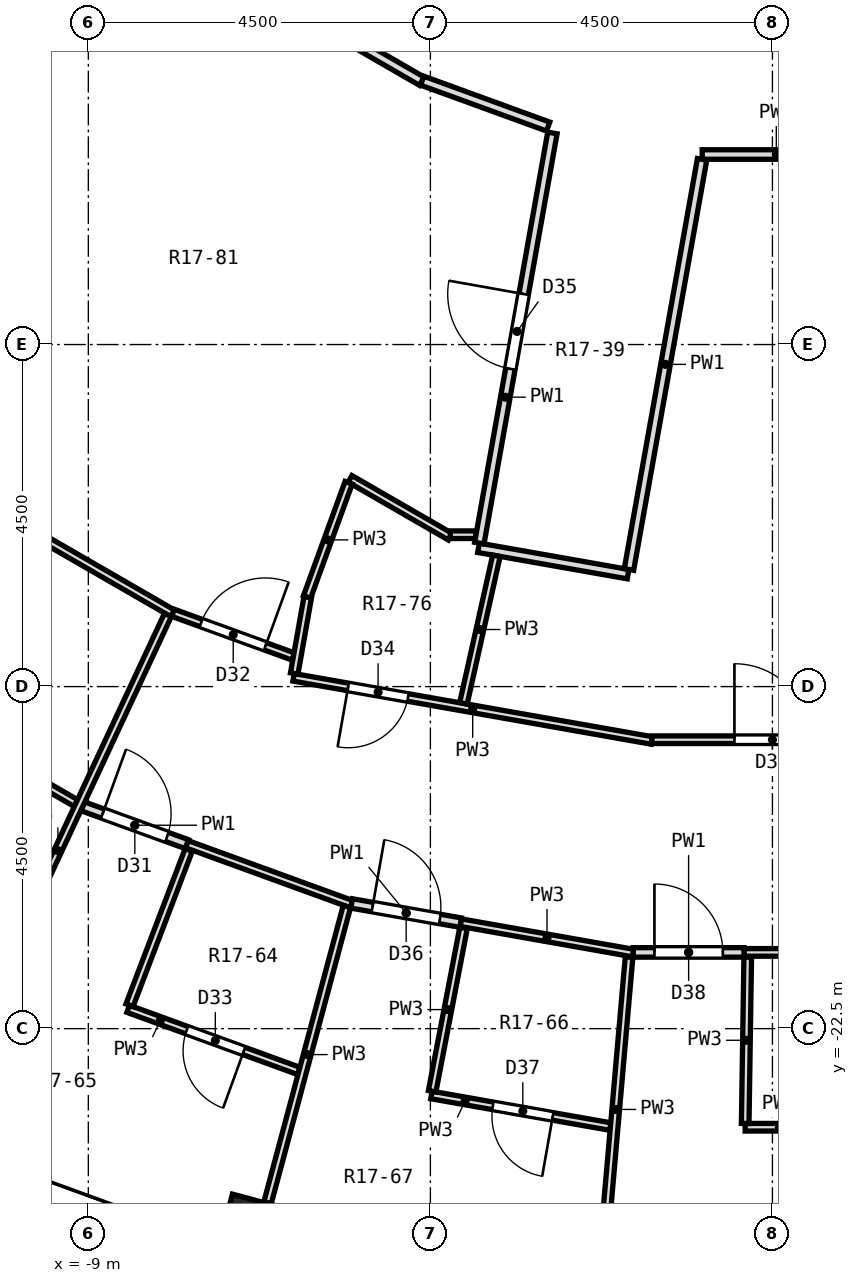
"""IFC4 building model, lengths in metres.
Left out: names, types, materials, properties, quantities, classifications, styles, units other than length and angle.
Written with IfcOpenShell. Run it as: python <this file> out.ifc"""

import sys

from ifc_helpers import new_model, si_unit, direction, frame, frame_2d, origin, origin_2d, place, context, subcontext, project, spatial, rectangle, extrude, element, fill, save


model = new_model("IFC4")
c1 = context("Model", 3, precision=1e-05, world=origin(), true_north=direction((0.0, 1.0)))
c2 = subcontext(c1, "Body", "Model", "MODEL_VIEW")
j1 = project(units=[si_unit("LENGTHUNIT", "METRE"), si_unit("PLANEANGLEUNIT", "RADIAN")], contexts=[c1])
p1 = place(None, origin())
s1 = spatial("IfcSite", under=j1, at=p1, CompositionType="ELEMENT")
p2 = place(p1, origin())
s2 = spatial("IfcBuilding", under=s1, at=p2, CompositionType="ELEMENT")
p3 = place(p2, frame((0.0, 0.0, 91.9)))
s3 = spatial("IfcBuildingStorey", under=s2, at=p3, CompositionType="ELEMENT", Elevation=91.9)
p4 = place(p3, frame((-6.768, -25.259, 0.0), z_axis=(0.0, 0.0, 1.0), x_axis=(-0.258819045103, -0.965925826289, 0.0)))
e1 = element("IfcColumn", 1, at=p4, inside=s3, PredefinedType="COLUMN", context=c2, shape_type="SweptSolid", body=[
    extrude(rectangle(XDim=0.95, YDim=0.95, at=origin_2d()), origin(), (0.0, 0.0, 1.0), 3.3),
])
p5 = place(p3, frame((-10.811, -24.369, 0.0), z_axis=(0.0, 0.0, 1.0), x_axis=(0.939703505393, -0.341990236633, 0.0)))
e2 = element("IfcWall", 2, at=p5, inside=s3, PredefinedType="SOLIDWALL", context=c2, shape_type="SweptSolid", body=[
    extrude(rectangle(XDim=3.648, YDim=0.6, at=frame_2d((1.824, 0.0))), origin(), (0.0, 0.0, 1.0), 2.8),
])
p6 = place(p5, frame((0.674, 0.0, 0.9)))
e3 = element("IfcOpeningElement", 3, at=p6, cuts=e2, PredefinedType="OPENING", context=c2, shape_type="SweptSolid", body=[
    extrude(rectangle(XDim=2.3, YDim=1.8, at=frame_2d((1.15, 0.9))), frame((0.0, 0.312, 0.0), z_axis=(0.0, -1.0, 0.0), x_axis=(1.0, 0.0, 0.0)), (0.0, 0.0, 1.0), 0.624),
])
p7 = place(p3, frame((-11.072, -18.43, 0.0), z_axis=(0.0, 0.0, 1.0), x_axis=(0.865848017448, -0.500307116361, 0.0)))
e4 = element("IfcWall", 4, at=p7, inside=s3, PredefinedType="PARTITIONING", context=c2, shape_type="SweptSolid", body=[
    extrude(rectangle(XDim=2.205, YDim=0.1, at=frame_2d((1.102, 0.0))), origin(), (0.0, 0.0, 1.0), 2.8),
])
p8 = place(p3, frame((-10.723, -15.401, 0.0), z_axis=(0.0, 0.0, 1.0), x_axis=(0.866002935623, -0.500038913978, 0.0)))
e5 = element("IfcWall", 5, at=p8, inside=s3, PredefinedType="PARTITIONING", context=c2, shape_type="SweptSolid", body=[
    extrude(rectangle(XDim=3.272, YDim=0.1, at=frame_2d((1.636, 0.0))), origin(), (0.0, 0.0, 1.0), 2.8),
])
p9 = place(p3, frame((-5.557, -15.267, 0.0), z_axis=(0.0, 0.0, 1.0), x_axis=(0.866084140742, -0.499898250802, 0.0)))
e6 = element("IfcWall", 6, at=p9, inside=s3, PredefinedType="PARTITIONING", context=c2, shape_type="SweptSolid", body=[
    extrude(rectangle(XDim=1.523, YDim=0.1, at=frame_2d((0.761, 0.0))), origin(), (0.0, 0.0, 1.0), 2.8),
])
p10 = place(p3, frame((-6.278, -9.074, 0.0), z_axis=(0.0, 0.0, 1.0), x_axis=(0.865970077019, -0.500095816526, 0.0)))
e7 = element("IfcWall", 7, at=p10, inside=s3, PredefinedType="PARTITIONING", context=c2, shape_type="SweptSolid", body=[
    extrude(rectangle(XDim=1.924, YDim=0.125, at=frame_2d((0.962, 0.0))), origin(), (0.0, 0.0, 1.0), 2.8),
])
p11 = place(p3, frame((-8.476, -22.239, 0.0), z_axis=(0.0, 0.0, 1.0), x_axis=(0.939644231496, -0.342153062556, 0.0)))
e8 = element("IfcWall", 8, at=p11, inside=s3, PredefinedType="PARTITIONING", context=c2, shape_type="SweptSolid", body=[
    extrude(rectangle(XDim=2.39, YDim=0.1, at=frame_2d((1.195, 0.0))), origin(), (0.0, 0.0, 1.0), 2.8),
])
p12 = place(p11, frame((0.82, 0.0, 0.0)))
e9 = element("IfcOpeningElement", 9, at=p12, cuts=e8, PredefinedType="OPENING", context=c2, shape_type="SweptSolid", body=[
    extrude(rectangle(XDim=0.8, YDim=2.1, at=frame_2d((0.4, 1.05))), frame((0.0, 0.062, 0.0), z_axis=(0.0, -1.0, 0.0), x_axis=(1.0, 0.0, 0.0)), (0.0, 0.0, 1.0), 0.124),
])
p13 = place(p3, frame((-7.704, -20.073, 0.0), z_axis=(0.0, 0.0, 1.0), x_axis=(0.939734670151, -0.34190459154, 0.0)))
e10 = element("IfcWall", 10, at=p13, inside=s3, PredefinedType="PARTITIONING", context=c2, shape_type="SweptSolid", body=[
    extrude(rectangle(XDim=2.306, YDim=0.1, at=frame_2d((1.153, 0.0))), origin(), (0.0, 0.0, 1.0), 2.8),
])
p14 = place(p3, frame((-9.073, -19.575, 0.0), z_axis=(0.0, 0.0, 1.0), x_axis=(0.939788529673, -0.341756520778, 0.0)))
e11 = element("IfcWall", 11, at=p14, inside=s3, PredefinedType="PARTITIONING", context=c2, shape_type="SweptSolid", body=[
    extrude(rectangle(XDim=1.457, YDim=0.125, at=frame_2d((0.728, 0.0))), origin(), (0.0, 0.0, 1.0), 2.8),
])
p15 = place(p14, frame((0.278, 0.0, 0.0)))
e12 = element("IfcOpeningElement", 12, at=p15, cuts=e11, PredefinedType="OPENING", context=c2, shape_type="SweptSolid", body=[
    extrude(rectangle(XDim=0.9, YDim=2.1, at=frame_2d((0.45, 1.05))), frame((0.0, 0.074, 0.0), z_axis=(0.0, -1.0, 0.0), x_axis=(1.0, 0.0, 0.0)), (0.0, 0.0, 1.0), 0.149),
])
p16 = place(p3, frame((-7.886, -17.029, 0.0), z_axis=(0.0, 0.0, 1.0), x_axis=(0.939806110693, -0.341708171258, 0.0)))
e13 = element("IfcWall", 13, at=p16, inside=s3, PredefinedType="PARTITIONING", context=c2, shape_type="SweptSolid", body=[
    extrude(rectangle(XDim=1.686, YDim=0.1, at=frame_2d((0.843, 0.0))), origin(), (0.0, 0.0, 1.0), 2.8),
])
p17 = place(p16, frame((0.393, 0.0, 0.0)))
e14 = element("IfcOpeningElement", 14, at=p17, cuts=e13, PredefinedType="OPENING", context=c2, shape_type="SweptSolid", body=[
    extrude(rectangle(XDim=0.9, YDim=2.1, at=frame_2d((0.45, 1.05))), frame((0.0, 0.062, 0.0), z_axis=(0.0, -1.0, 0.0), x_axis=(1.0, 0.0, 0.0)), (0.0, 0.0, 1.0), 0.124),
])
p18 = place(p3, frame((-4.608, -10.028, 0.0), z_axis=(0.0, 0.0, 1.0), x_axis=(0.939587139824, -0.342309810958, 0.0)))
e15 = element("IfcWall", 15, at=p18, inside=s3, PredefinedType="PARTITIONING", context=c2, shape_type="SweptSolid", body=[
    extrude(rectangle(XDim=1.764, YDim=0.125, at=frame_2d((0.882, 0.0))), origin(), (0.0, 0.0, 1.0), 2.8),
])
p19 = place(p3, frame((-4.486, -23.373, 0.0), z_axis=(0.0, 0.0, 1.0), x_axis=(0.984798975022, -0.17369795277, 0.0)))
e16 = element("IfcWall", 16, at=p19, inside=s3, PredefinedType="PARTITIONING", context=c2, shape_type="SweptSolid", body=[
    extrude(rectangle(XDim=2.391, YDim=0.1, at=frame_2d((1.195, 0.0))), origin(), (0.0, 0.0, 1.0), 2.8),
])
p20 = place(p19, frame((0.821, 0.0, 0.0)))
e17 = element("IfcOpeningElement", 17, at=p20, cuts=e16, PredefinedType="OPENING", context=c2, shape_type="SweptSolid", body=[
    extrude(rectangle(XDim=0.8, YDim=2.1, at=frame_2d((0.4, 1.05))), frame((0.0, 0.062, 0.0), z_axis=(0.0, -1.0, 0.0), x_axis=(1.0, 0.0, 0.0)), (0.0, 0.0, 1.0), 0.124),
])
p21 = place(p3, frame((-4.101, -21.105, 0.0), z_axis=(0.0, 0.0, 1.0), x_axis=(0.984783558818, -0.173785333909, 0.0)))
e18 = element("IfcWall", 18, at=p21, inside=s3, PredefinedType="PARTITIONING", context=c2, shape_type="SweptSolid", body=[
    extrude(rectangle(XDim=2.305, YDim=0.1, at=frame_2d((1.153, 0.0))), origin(), (0.0, 0.0, 1.0), 2.8),
])
p22 = place(p3, frame((-5.536, -20.853, 0.0), z_axis=(0.0, 0.0, 1.0), x_axis=(0.984862774054, -0.173335848233, 0.0)))
e19 = element("IfcWall", 19, at=p22, inside=s3, PredefinedType="PARTITIONING", context=c2, shape_type="SweptSolid", body=[
    extrude(rectangle(XDim=1.456, YDim=0.125, at=frame_2d((0.728, 0.0))), origin(), (0.0, 0.0, 1.0), 2.8),
])
p23 = place(p22, frame((0.278, 0.0, 0.0)))
e20 = element("IfcOpeningElement", 20, at=p23, cuts=e19, PredefinedType="OPENING", context=c2, shape_type="SweptSolid", body=[
    extrude(rectangle(XDim=0.9, YDim=2.1, at=frame_2d((0.45, 1.05))), frame((0.0, 0.074, 0.0), z_axis=(0.0, -1.0, 0.0), x_axis=(1.0, 0.0, 0.0)), (0.0, 0.0, 1.0), 0.149),
])
p24 = place(p3, frame((-6.3, -17.878, 0.0), z_axis=(0.0, 0.0, 1.0), x_axis=(0.984813837489, -0.173613667348, 0.0)))
e21 = element("IfcWall", 21, at=p24, inside=s3, PredefinedType="PARTITIONING", context=c2, shape_type="SweptSolid", body=[
    extrude(rectangle(XDim=4.787, YDim=0.1, at=frame_2d((2.394, 0.0))), origin(), (0.0, 0.0, 1.0), 2.8),
])
p25 = place(p24, frame((0.729, 0.0, 0.0)))
e22 = element("IfcOpeningElement", 22, at=p25, cuts=e21, PredefinedType="OPENING", context=c2, shape_type="SweptSolid", body=[
    extrude(rectangle(XDim=0.8, YDim=2.1, at=frame_2d((0.4, 1.05))), frame((0.0, 0.062, 0.0), z_axis=(0.0, -1.0, 0.0), x_axis=(1.0, 0.0, 0.0)), (0.0, 0.0, 1.0), 0.124),
])
p26 = place(p3, frame((-3.867, -16.174, 0.0), z_axis=(0.0, 0.0, 1.0), x_axis=(0.984836400178, -0.173485633079, 0.0)))
e23 = element("IfcWall", 23, at=p26, inside=s3, PredefinedType="PARTITIONING", context=c2, shape_type="SweptSolid", body=[
    extrude(rectangle(XDim=1.998, YDim=0.125, at=frame_2d((0.999, 0.0))), origin(), (0.0, 0.0, 1.0), 2.8),
])
p27 = place(p3, frame((-0.359, -23.797, 0.0), z_axis=(0.0, 0.0, 1.0), x_axis=(1.0, 0.0, 0.0)))
e24 = element("IfcWall", 24, at=p27, inside=s3, PredefinedType="PARTITIONING", context=c2, shape_type="SweptSolid", body=[
    extrude(rectangle(XDim=2.391, YDim=0.1, at=frame_2d((1.195, 0.0))), origin(), (0.0, 0.0, 1.0), 2.8),
])
p28 = place(p27, frame((0.821, 0.0, 0.0)))
e25 = element("IfcOpeningElement", 25, at=p28, cuts=e24, PredefinedType="OPENING", context=c2, shape_type="SweptSolid", body=[
    extrude(rectangle(XDim=0.8, YDim=2.1, at=frame_2d((0.4, 1.05))), frame((0.0, 0.062, 0.0), z_axis=(0.0, -1.0, 0.0), x_axis=(1.0, 0.0, 0.0)), (0.0, 0.0, 1.0), 0.124),
])
p29 = place(p3, frame((-0.374, -21.497, 0.0), z_axis=(0.0, 0.0, 1.0), x_axis=(1.0, 0.0, 0.0)))
e26 = element("IfcWall", 26, at=p29, inside=s3, PredefinedType="PARTITIONING", context=c2, shape_type="SweptSolid", body=[
    extrude(rectangle(XDim=2.205, YDim=0.1, at=frame_2d((1.103, 0.0))), origin(), (0.0, 0.0, 1.0), 2.8),
])
p30 = place(p3, frame((-1.831, -21.497, 0.0), z_axis=(0.0, 0.0, 1.0), x_axis=(1.0, 0.0, 0.0)))
e27 = element("IfcWall", 27, at=p30, inside=s3, PredefinedType="PARTITIONING", context=c2, shape_type="SweptSolid", body=[
    extrude(rectangle(XDim=1.457, YDim=0.125, at=frame_2d((0.729, 0.0))), origin(), (0.0, 0.0, 1.0), 2.8),
])
p31 = place(p30, frame((0.279, 0.0, 0.0)))
e28 = element("IfcOpeningElement", 28, at=p31, cuts=e27, PredefinedType="OPENING", context=c2, shape_type="SweptSolid", body=[
    extrude(rectangle(XDim=0.9, YDim=2.1, at=frame_2d((0.45, 1.05))), frame((0.0, 0.074, 0.0), z_axis=(0.0, -1.0, 0.0), x_axis=(1.0, 0.0, 0.0)), (0.0, 0.0, 1.0), 0.149),
])
p32 = place(p3, frame((-1.586, -18.699, 0.0), z_axis=(0.0, 0.0, 1.0), x_axis=(1.0, 0.0, 0.0)))
e29 = element("IfcWall", 29, at=p32, inside=s3, PredefinedType="PARTITIONING", context=c2, shape_type="SweptSolid", body=[
    extrude(rectangle(XDim=3.273, YDim=0.1, at=frame_2d((1.636, 0.0))), origin(), (0.0, 0.0, 1.0), 2.8),
])
p33 = place(p32, frame((1.086, 0.0, 0.0)))
e30 = element("IfcOpeningElement", 30, at=p33, cuts=e29, PredefinedType="OPENING", context=c2, shape_type="SweptSolid", body=[
    extrude(rectangle(XDim=1.0, YDim=2.1, at=frame_2d((0.5, 1.05))), frame((0.0, 0.062, 0.0), z_axis=(0.0, -1.0, 0.0), x_axis=(1.0, 0.0, 0.0)), (0.0, 0.0, 1.0), 0.124),
])
p34 = place(p3, frame((-4.238, -16.002, 0.0), z_axis=(0.0, 0.0, 1.0), x_axis=(1.0, 0.0, 0.0)))
e31 = element("IfcWall", 31, at=p34, inside=s3, PredefinedType="PARTITIONING", context=c2, shape_type="SweptSolid", body=[
    extrude(rectangle(XDim=0.339, YDim=0.1, at=frame_2d((0.169, 0.0))), origin(), (0.0, 0.0, 1.0), 2.8),
])
p35 = place(p3, frame((-0.924, -11.0, 0.0), z_axis=(0.0, 0.0, 1.0), x_axis=(1.0, 0.0, 0.0)))
e32 = element("IfcWall", 32, at=p35, inside=s3, PredefinedType="PARTITIONING", context=c2, shape_type="SweptSolid", body=[
    extrude(rectangle(XDim=1.949, YDim=0.125, at=frame_2d((0.975, 0.0))), origin(), (0.0, 0.0, 1.0), 2.8),
])
p36 = place(p3, frame((-13.057, -13.049, 0.0), z_axis=(0.0, 0.0, 1.0), x_axis=(0.708367099834, 0.705844212183, 0.0)))
e33 = element("IfcWall", 33, at=p36, inside=s3, PredefinedType="PARTITIONING", context=c2, shape_type="SweptSolid", body=[
    extrude(rectangle(XDim=7.354, YDim=0.125, at=frame_2d((3.677, 0.0))), origin(), (0.0, 0.0, 1.0), 2.8),
])
p37 = place(p3, frame((-10.848, -23.26, 0.0), z_axis=(0.0, 0.0, 1.0), x_axis=(0.422908898334, 0.906172204225, 0.0)))
e34 = element("IfcWall", 34, at=p37, inside=s3, PredefinedType="PARTITIONING", context=c2, shape_type="SweptSolid", body=[
    extrude(rectangle(XDim=6.844, YDim=0.1, at=frame_2d((3.422, 0.0))), origin(), (0.0, 0.0, 1.0), 2.8),
])
p38 = place(p3, frame((-8.458, -22.192, 0.0), z_axis=(0.0, 0.0, 1.0), x_axis=(0.356134598474, 0.93443466747, 0.0)))
e35 = element("IfcWall", 35, at=p38, inside=s3, PredefinedType="PARTITIONING", context=c2, shape_type="SweptSolid", body=[
    extrude(rectangle(XDim=2.187, YDim=0.1, at=frame_2d((1.093, 0.0))), origin(), (0.0, 0.0, 1.0), 2.8),
])
p39 = place(p3, frame((-6.123, -16.823, 0.0), z_axis=(0.0, 0.0, 1.0), x_axis=(0.342085762609, 0.939668734725, 0.0)))
e36 = element("IfcWall", 36, at=p39, inside=s3, PredefinedType="PARTITIONING", context=c2, shape_type="SweptSolid", body=[
    extrude(rectangle(XDim=1.602, YDim=0.1, at=frame_2d((0.801, 0.0))), origin(), (0.0, 0.0, 1.0), 2.8),
])
p40 = place(p3, frame((-6.642, -24.791, 0.0), z_axis=(0.0, 0.0, 1.0), x_axis=(0.258615129659, 0.965980442199, 0.0)))
e37 = element("IfcWall", 37, at=p40, inside=s3, PredefinedType="PARTITIONING", context=c2, shape_type="SweptSolid", body=[
    extrude(rectangle(XDim=4.036, YDim=0.1, at=frame_2d((2.018, 0.0))), origin(), (0.0, 0.0, 1.0), 2.8),
])
p41 = place(p3, frame((-4.065, -18.22, 0.0), z_axis=(0.0, 0.0, 1.0), x_axis=(0.218112956179, 0.975923530994, 0.0)))
e38 = element("IfcWall", 38, at=p41, inside=s3, PredefinedType="PARTITIONING", context=c2, shape_type="SweptSolid", body=[
    extrude(rectangle(XDim=1.989, YDim=0.1, at=frame_2d((0.995, 0.0))), origin(), (0.0, 0.0, 1.0), 2.8),
])
p42 = place(p3, frame((-4.477, -23.324, 0.0), z_axis=(0.0, 0.0, 1.0), x_axis=(0.188685986474, 0.982037473067, 0.0)))
e39 = element("IfcWall", 39, at=p42, inside=s3, PredefinedType="PARTITIONING", context=c2, shape_type="SweptSolid", body=[
    extrude(rectangle(XDim=2.188, YDim=0.1, at=frame_2d((1.094, 0.0))), origin(), (0.0, 0.0, 1.0), 2.8),
])
p43 = place(p3, frame((-1.887, -16.459, 0.0), z_axis=(0.0, 0.0, 1.0), x_axis=(0.175533190832, 0.984473513568, 0.0)))
e40 = element("IfcWall", 40, at=p43, inside=s3, PredefinedType="PARTITIONING", context=c2, shape_type="SweptSolid", body=[
    extrude(rectangle(XDim=5.481, YDim=0.125, at=frame_2d((2.741, 0.0))), origin(), (0.0, 0.0, 1.0), 2.8),
])
p44 = place(p3, frame((-3.856, -16.113, 0.0), z_axis=(0.0, 0.0, 1.0), x_axis=(0.175360511149, 0.984504287004, 0.0)))
e41 = element("IfcWall", 41, at=p44, inside=s3, PredefinedType="PARTITIONING", context=c2, shape_type="SweptSolid", body=[
    extrude(rectangle(XDim=5.481, YDim=0.125, at=frame_2d((2.741, 0.0))), origin(), (0.0, 0.0, 1.0), 2.8),
])
p45 = place(p44, frame((2.329, 0.0, 0.0)))
e42 = element("IfcOpeningElement", 42, at=p45, cuts=e41, PredefinedType="OPENING", context=c2, shape_type="SweptSolid", body=[
    extrude(rectangle(XDim=1.0, YDim=2.1, at=frame_2d((0.5, 1.05))), frame((0.0, 0.074, 0.0), z_axis=(0.0, -1.0, 0.0), x_axis=(1.0, 0.0, 0.0)), (0.0, 0.0, 1.0), 0.149),
])
p46 = place(p3, frame((-6.292, -17.828, 0.0), z_axis=(0.0, 0.0, 1.0), x_axis=(0.174455149241, 0.984665121198, 0.0)))
e43 = element("IfcWall", 43, at=p46, inside=s3, PredefinedType="PARTITIONING", context=c2, shape_type="SweptSolid", body=[
    extrude(rectangle(XDim=1.019, YDim=0.1, at=frame_2d((0.509, 0.0))), origin(), (0.0, 0.0, 1.0), 2.8),
])
p47 = place(p3, frame((-2.237, -25.567, 0.0), z_axis=(0.0, 0.0, 1.0), x_axis=(0.087137593131, 0.996196285811, 0.0)))
e44 = element("IfcWall", 44, at=p47, inside=s3, PredefinedType="PARTITIONING", context=c2, shape_type="SweptSolid", body=[
    extrude(rectangle(XDim=4.023, YDim=0.1, at=frame_2d((2.012, 0.0))), origin(), (0.0, 0.0, 1.0), 2.8),
])
p48 = place(p3, frame((-0.358, -23.747, 0.0), z_axis=(0.0, 0.0, 1.0), x_axis=(0.015176823242, 0.999884825386, 0.0)))
e45 = element("IfcWall", 45, at=p48, inside=s3, PredefinedType="PARTITIONING", context=c2, shape_type="SweptSolid", body=[
    extrude(rectangle(XDim=2.188, YDim=0.1, at=frame_2d((1.094, 0.0))), origin(), (0.0, 0.0, 1.0), 2.8),
])
p49 = place(p6, origin())
e46 = element("IfcWindow", 46, at=p49, inside=s3, PartitioningType="SINGLE_PANEL", PredefinedType="WINDOW", context=c2, shape_type="SweptSolid", body=[
    extrude(rectangle(XDim=2.3, YDim=1.8, at=frame_2d((1.15, 0.9))), frame((0.0, 0.18, 0.0), z_axis=(0.0, -1.0, 0.0), x_axis=(1.0, 0.0, 0.0)), (0.0, 0.0, 1.0), 0.06),
])
fill(e3, e46)
p50 = place(p15, origin())
e47 = element("IfcDoor", 47, at=p50, inside=s3, OperationType="SINGLE_SWING_LEFT", PredefinedType="DOOR", context=c2, shape_type="SweptSolid", body=[
    extrude(rectangle(XDim=0.9, YDim=2.1, at=frame_2d((0.45, 1.05))), frame((0.0, 0.025, 0.0), z_axis=(0.0, -1.0, 0.0), x_axis=(1.0, 0.0, 0.0)), (0.0, 0.0, 1.0), 0.05),
])
fill(e12, e47)
p51 = place(p17, origin())
e48 = element("IfcDoor", 48, at=p51, inside=s3, OperationType="SINGLE_SWING_RIGHT", PredefinedType="DOOR", context=c2, shape_type="SweptSolid", body=[
    extrude(rectangle(XDim=0.9, YDim=2.1, at=frame_2d((0.45, 1.05))), frame((0.0, 0.025, 0.0), z_axis=(0.0, -1.0, 0.0), x_axis=(1.0, 0.0, 0.0)), (0.0, 0.0, 1.0), 0.05),
])
fill(e14, e48)
p52 = place(p12, frame((0.8, 0.0, 0.0), z_axis=(0.0, 0.0, 1.0), x_axis=(-1.0, 0.0, 0.0)))
e49 = element("IfcDoor", 49, at=p52, inside=s3, OperationType="SINGLE_SWING_LEFT", PredefinedType="DOOR", context=c2, shape_type="SweptSolid", body=[
    extrude(rectangle(XDim=0.8, YDim=2.1, at=frame_2d((0.4, 1.05))), frame((0.0, 0.025, 0.0), z_axis=(0.0, -1.0, 0.0), x_axis=(1.0, 0.0, 0.0)), (0.0, 0.0, 1.0), 0.05),
])
fill(e9, e49)
p53 = place(p25, frame((0.8, 0.0, 0.0), z_axis=(0.0, 0.0, 1.0), x_axis=(-1.0, 0.0, 0.0)))
e50 = element("IfcDoor", 50, at=p53, inside=s3, OperationType="SINGLE_SWING_RIGHT", PredefinedType="DOOR", context=c2, shape_type="SweptSolid", body=[
    extrude(rectangle(XDim=0.8, YDim=2.1, at=frame_2d((0.4, 1.05))), frame((0.0, 0.025, 0.0), z_axis=(0.0, -1.0, 0.0), x_axis=(1.0, 0.0, 0.0)), (0.0, 0.0, 1.0), 0.05),
])
fill(e22, e50)
p54 = place(p45, origin())
e51 = element("IfcDoor", 51, at=p54, inside=s3, OperationType="SINGLE_SWING_RIGHT", PredefinedType="DOOR", context=c2, shape_type="SweptSolid", body=[
    extrude(rectangle(XDim=1.0, YDim=2.1, at=frame_2d((0.5, 1.05))), frame((0.0, 0.025, 0.0), z_axis=(0.0, -1.0, 0.0), x_axis=(1.0, 0.0, 0.0)), (0.0, 0.0, 1.0), 0.05),
])
fill(e42, e51)
p55 = place(p23, origin())
e52 = element("IfcDoor", 52, at=p55, inside=s3, OperationType="SINGLE_SWING_LEFT", PredefinedType="DOOR", context=c2, shape_type="SweptSolid", body=[
    extrude(rectangle(XDim=0.9, YDim=2.1, at=frame_2d((0.45, 1.05))), frame((0.0, 0.025, 0.0), z_axis=(0.0, -1.0, 0.0), x_axis=(1.0, 0.0, 0.0)), (0.0, 0.0, 1.0), 0.05),
])
fill(e20, e52)
p56 = place(p20, frame((0.8, 0.0, 0.0), z_axis=(0.0, 0.0, 1.0), x_axis=(-1.0, 0.0, 0.0)))
e53 = element("IfcDoor", 53, at=p56, inside=s3, OperationType="SINGLE_SWING_LEFT", PredefinedType="DOOR", context=c2, shape_type="SweptSolid", body=[
    extrude(rectangle(XDim=0.8, YDim=2.1, at=frame_2d((0.4, 1.05))), frame((0.0, 0.025, 0.0), z_axis=(0.0, -1.0, 0.0), x_axis=(1.0, 0.0, 0.0)), (0.0, 0.0, 1.0), 0.05),
])
fill(e17, e53)
p57 = place(p31, origin())
e54 = element("IfcDoor", 54, at=p57, inside=s3, OperationType="SINGLE_SWING_LEFT", PredefinedType="DOOR", context=c2, shape_type="SweptSolid", body=[
    extrude(rectangle(XDim=0.9, YDim=2.1, at=frame_2d((0.45, 1.05))), frame((0.0, 0.025, 0.0), z_axis=(0.0, -1.0, 0.0), x_axis=(1.0, 0.0, 0.0)), (0.0, 0.0, 1.0), 0.05),
])
fill(e28, e54)
p58 = place(p33, origin())
e55 = element("IfcDoor", 55, at=p58, inside=s3, OperationType="SINGLE_SWING_LEFT", PredefinedType="DOOR", context=c2, shape_type="SweptSolid", body=[
    extrude(rectangle(XDim=1.0, YDim=2.1, at=frame_2d((0.5, 1.05))), frame((0.0, 0.025, 0.0), z_axis=(0.0, -1.0, 0.0), x_axis=(1.0, 0.0, 0.0)), (0.0, 0.0, 1.0), 0.05),
])
fill(e30, e55)
save(model, sys.argv[1])
